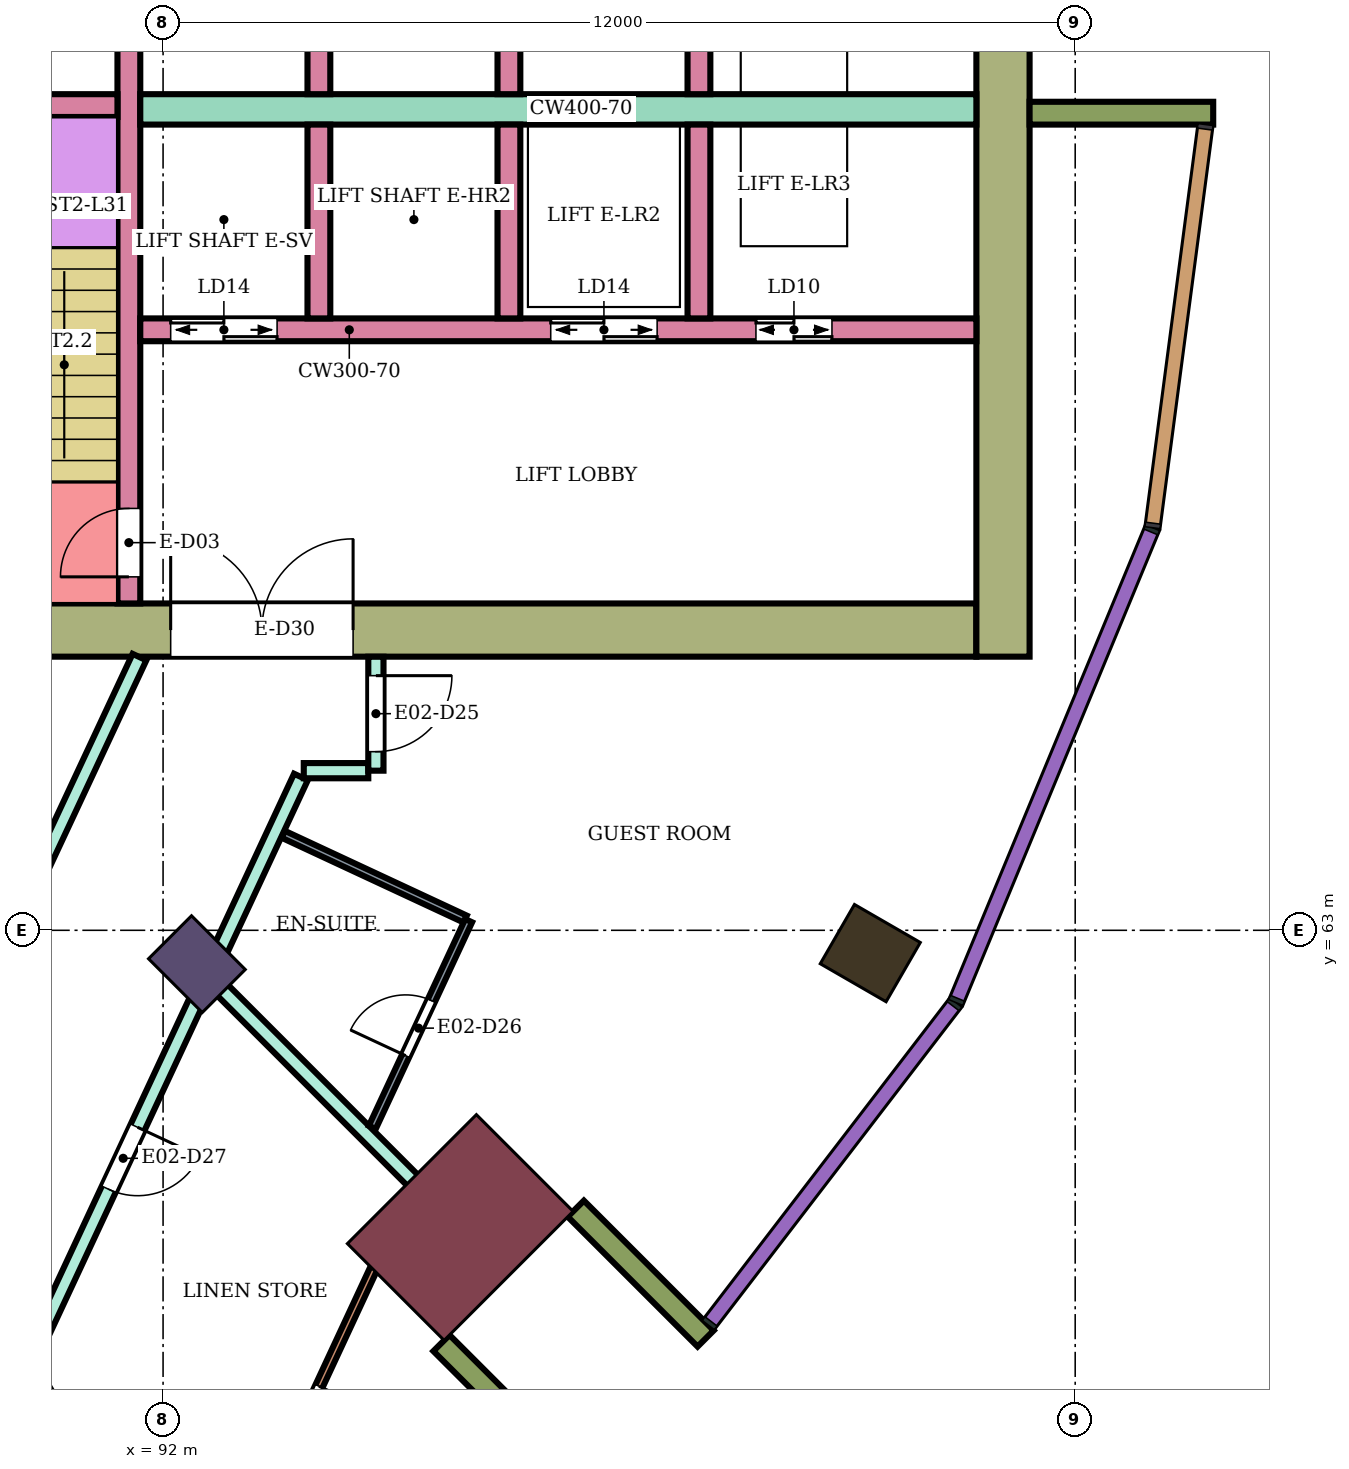
"""IFC4 building model, lengths in metres.
Left out: names, types, materials, properties, quantities, classifications, styles, units other than length and angle.
Written with IfcOpenShell. Run it as: python <this file> out.ifc"""

import sys

from ifc_helpers import new_model, si_unit, direction, frame, frame_2d, origin, origin_2d, place, context, subcontext, project, spatial, rectangle, extrude, element, fill, save


model = new_model("IFC4")
c1 = context("Model", 3, precision=1e-05, world=origin(), true_north=direction((0.0, 1.0)))
c2 = subcontext(c1, "Body", "Model", "MODEL_VIEW")
j1 = project(units=[si_unit("LENGTHUNIT", "METRE"), si_unit("PLANEANGLEUNIT", "RADIAN")], contexts=[c1])
p1 = place(None, origin())
s1 = spatial("IfcSite", under=j1, at=p1, CompositionType="ELEMENT")
p2 = place(p1, origin())
s2 = spatial("IfcBuilding", under=s1, at=p2, CompositionType="ELEMENT")
p3 = place(p2, frame((0.0, 0.0, 134.1)))
s3 = spatial("IfcBuildingStorey", under=s2, at=p3, CompositionType="ELEMENT", Elevation=134.1)
p4 = place(p3, frame((101.304, 62.7, 0.0), z_axis=(0.0, 0.0, 1.0), x_axis=(0.866025403784, -0.5, 0.0)))
e1 = element("IfcColumn", 1, at=p4, inside=s3, PredefinedType="COLUMN", context=c2, shape_type="SweptSolid", body=[
    extrude(rectangle(XDim=1.0, YDim=0.9, at=origin_2d()), origin(), (0.0, 0.0, 1.0), 3.9),
])
p5 = place(p3, frame((92.445, 62.555, 0.0), z_axis=(0.0, 0.0, 1.0), x_axis=(0.707106781187, -0.707106781187, 0.0)))
e2 = element("IfcColumn", 2, at=p5, inside=s3, PredefinedType="COLUMN", context=c2, shape_type="SweptSolid", body=[
    extrude(rectangle(XDim=1.0, YDim=0.8, at=origin_2d()), origin(), (0.0, 0.0, 1.0), 3.9),
])
p6 = place(p3, frame((95.91, 59.09, 0.0), z_axis=(0.0, 0.0, 1.0), x_axis=(0.707106781187, -0.707106781187, 0.0)))
e3 = element("IfcColumn", 3, at=p6, inside=s3, PredefinedType="COLUMN", context=c2, shape_type="SweptSolid", body=[
    extrude(rectangle(XDim=1.8, YDim=2.4, at=origin_2d()), origin(), (0.0, 0.0, 1.0), 3.9),
])
p7 = place(p3, frame((87.9, 66.95, 0.0), z_axis=(0.0, 0.0, 1.0), x_axis=(1.0, 0.0, 0.0)))
e4 = element("IfcWall", 4, at=p7, inside=s3, PredefinedType="SHEAR", context=c2, shape_type="SweptSolid", body=[
    extrude(rectangle(XDim=14.8, YDim=0.7, at=frame_2d((7.4, 0.0))), origin(), (0.0, 0.0, 1.0), 3.58),
])
p8 = place(p7, frame((4.2, 0.0, 0.0)))
e5 = element("IfcOpeningElement", 5, at=p8, cuts=e4, PredefinedType="OPENING", context=c2, shape_type="SweptSolid", body=[
    extrude(rectangle(XDim=2.4, YDim=2.4, at=frame_2d((1.2, 1.2))), frame((0.0, 0.36, 0.0), z_axis=(0.0, -1.0, 0.0), x_axis=(1.0, 0.0, 0.0)), (0.0, 0.0, 1.0), 0.72),
])
p9 = place(p3, frame((103.05, 66.6, 0.0), z_axis=(0.0, 0.0, 1.0), x_axis=(0.0, 1.0, 0.0)))
e6 = element("IfcWall", 6, at=p9, inside=s3, PredefinedType="SHEAR", context=c2, shape_type="SweptSolid", body=[
    extrude(rectangle(XDim=16.8, YDim=0.7, at=frame_2d((8.4, 0.0))), origin(), (0.0, 0.0, 1.0), 3.58),
])
p10 = place(p3, frame((91.55, 67.3, 0.0), z_axis=(0.0, 0.0, 1.0), x_axis=(0.0, 1.0, 0.0)))
e7 = element("IfcWall", 7, at=p10, inside=s3, PredefinedType="SHEAR", context=c2, shape_type="SweptSolid", body=[
    extrude(rectangle(XDim=7.7, YDim=0.3, at=frame_2d((3.85, 0.0))), origin(), (0.0, 0.0, 1.0), 3.58),
])
p11 = place(p10, frame((0.35, 0.0, 0.0)))
e8 = element("IfcOpeningElement", 8, at=p11, cuts=e7, PredefinedType="OPENING", context=c2, shape_type="SweptSolid", body=[
    extrude(rectangle(XDim=0.9, YDim=2.1, at=frame_2d((0.45, 1.05))), frame((0.0, 0.16, 0.0), z_axis=(0.0, -1.0, 0.0), x_axis=(1.0, 0.0, 0.0)), (0.0, 0.0, 1.0), 0.32),
])
p12 = place(p3, frame((88.35, 73.85, 0.0), z_axis=(0.0, 0.0, 1.0), x_axis=(1.0, 0.0, 0.0)))
e9 = element("IfcWall", 9, at=p12, inside=s3, PredefinedType="SHEAR", context=c2, shape_type="SweptSolid", body=[
    extrude(rectangle(XDim=3.05, YDim=0.3, at=frame_2d((1.525, 0.0))), origin(), (0.0, 0.0, 1.0), 3.58),
])
p13 = place(p3, frame((91.7, 73.8, 0.0), z_axis=(0.0, 0.0, 1.0), x_axis=(1.0, 0.0, 0.0)))
e10 = element("IfcWall", 10, at=p13, inside=s3, PredefinedType="SHEAR", context=c2, shape_type="SweptSolid", body=[
    extrude(rectangle(XDim=11.0, YDim=0.4, at=frame_2d((5.5, 0.0))), origin(), (0.0, 0.0, 1.0), 3.58),
])
p14 = place(p3, frame((91.7, 70.9, 0.0), z_axis=(0.0, 0.0, 1.0), x_axis=(1.0, 0.0, 0.0)))
e11 = element("IfcWall", 11, at=p14, inside=s3, PredefinedType="SHEAR", context=c2, shape_type="SweptSolid", body=[
    extrude(rectangle(XDim=11.0, YDim=0.3, at=frame_2d((5.5, 0.0))), origin(), (0.0, 0.0, 1.0), 3.58),
])
p15 = place(p14, frame((0.4, 0.0, 0.0)))
e12 = element("IfcOpeningElement", 12, at=p15, cuts=e11, PredefinedType="OPENING", context=c2, shape_type="SweptSolid", body=[
    extrude(rectangle(XDim=1.4, YDim=2.1, at=frame_2d((0.7, 1.05))), frame((0.0, 0.16, 0.0), z_axis=(0.0, -1.0, 0.0), x_axis=(1.0, 0.0, 0.0)), (0.0, 0.0, 1.0), 0.32),
])
p16 = place(p14, frame((5.4, 0.0, 0.0)))
e13 = element("IfcOpeningElement", 13, at=p16, cuts=e11, PredefinedType="OPENING", context=c2, shape_type="SweptSolid", body=[
    extrude(rectangle(XDim=1.4, YDim=2.1, at=frame_2d((0.7, 1.05))), frame((0.0, 0.16, 0.0), z_axis=(0.0, -1.0, 0.0), x_axis=(1.0, 0.0, 0.0)), (0.0, 0.0, 1.0), 0.32),
])
p17 = place(p14, frame((8.1, 0.0, 0.0)))
e14 = element("IfcOpeningElement", 14, at=p17, cuts=e11, PredefinedType="OPENING", context=c2, shape_type="SweptSolid", body=[
    extrude(rectangle(XDim=1.0, YDim=2.1, at=frame_2d((0.5, 1.05))), frame((0.0, 0.16, 0.0), z_axis=(0.0, -1.0, 0.0), x_axis=(1.0, 0.0, 0.0)), (0.0, 0.0, 1.0), 0.32),
])
for number, where, z_axis, x_axis in (
    (15, (94.05, 74.0, 0.0), (0.0, 0.0, 1.0), (0.0, 1.0, 0.0)),
    (16, (96.55, 74.0, 0.0), (0.0, 0.0, 1.0), (0.0, 1.0, 0.0)),
    (17, (99.05, 74.0, 0.0), (0.0, 0.0, 1.0), (0.0, 1.0, 0.0)),
    (18, (94.05, 71.05, 0.0), (0.0, 0.0, 1.0), (0.0, 1.0, 0.0)),
    (19, (96.55, 71.05, 0.0), (0.0, 0.0, 1.0), (0.0, 1.0, 0.0)),
    (20, (99.05, 71.05, 0.0), (0.0, 0.0, 1.0), (0.0, 1.0, 0.0)),
):
    element("IfcWall", number, at=place(p3, frame(where, z_axis=z_axis, x_axis=x_axis)), inside=s3, PredefinedType="SHEAR", context=c2, shape_type="SweptSolid", body=[
        extrude(rectangle(XDim=2.55, YDim=0.3, at=frame_2d((1.275, 0.0))), origin(), (0.0, 0.0, 1.0), 3.58),
    ])
for number, where, z_axis, x_axis in (
    (21, (103.4, 73.75, 0.0), (0.0, 0.0, 1.0), (1.0, 0.0, 0.0)),
    (22, (95.662, 57.57, 0.0), (0.0, 0.0, 1.0), (0.707, -0.707, 0.0)),
    (23, (97.43, 59.338, 0.0), (0.0, 0.0, 1.0), (0.707, -0.707, 0.0)),
):
    element("IfcWall", number, at=place(p3, frame(where, z_axis=z_axis, x_axis=x_axis)), inside=s3, PredefinedType="NOTDEFINED", context=c2, shape_type="SweptSolid", body=[
        extrude(rectangle(XDim=2.416, YDim=0.3, at=frame_2d((1.208, 0.0))), origin(), (0.0, 0.0, 1.0), 3.9),
    ])
p18 = place(p3, frame((88.502, 59.774, 0.0), z_axis=(0.0, 0.0, 1.0), x_axis=(0.423423307095, 0.905931952747, 0.0)))
e24 = element("IfcWall", 24, at=p18, inside=s3, PredefinedType="PARTITIONING", context=c2, shape_type="SweptSolid", body=[
    extrude(rectangle(XDim=7.529, YDim=0.2, at=frame_2d((3.764, 0.0))), origin(), (0.0, 0.0, 1.0), 3.45),
])
p19 = place(p3, frame((90.16, 57.396, 0.0), z_axis=(0.0, 0.0, 1.0), x_axis=(0.499848624781, -0.86611278267, 0.0)))
e25 = element("IfcWall", 25, at=p19, inside=s3, PredefinedType="PARTITIONING", context=c2, shape_type="SweptSolid", body=[
    extrude(rectangle(XDim=5.472, YDim=0.2, at=frame_2d((2.736, 0.0))), origin(), (0.0, 0.0, 1.0), 3.45),
])
p20 = place(p3, frame((90.346, 57.578, 0.0), z_axis=(0.0, 0.0, 1.0), x_axis=(0.422476720533, 0.906373775331, 0.0)))
e26 = element("IfcWall", 26, at=p20, inside=s3, PredefinedType="PARTITIONING", context=c2, shape_type="SweptSolid", body=[
    extrude(rectangle(XDim=8.208, YDim=0.2, at=frame_2d((4.104, 0.0))), origin(), (0.0, 0.0, 1.0), 3.45),
])
p21 = place(p20, frame((2.223, 0.0, 0.0)))
e27 = element("IfcOpeningElement", 27, at=p21, cuts=e26, PredefinedType="OPENING", context=c2, shape_type="SweptSolid", body=[
    extrude(rectangle(XDim=0.9, YDim=2.1, at=frame_2d((0.45, 1.05))), frame((0.0, 0.11, 0.0), z_axis=(0.0, -1.0, 0.0), x_axis=(1.0, 0.0, 0.0)), (0.0, 0.0, 1.0), 0.22),
])
p22 = place(p3, frame((92.692, 62.303, 0.0), z_axis=(0.0, 0.0, 1.0), x_axis=(0.706943936447, -0.707269588432, 0.0)))
e28 = element("IfcWall", 28, at=p22, inside=s3, PredefinedType="PARTITIONING", context=c2, shape_type="SweptSolid", body=[
    extrude(rectangle(XDim=5.248, YDim=0.2, at=frame_2d((2.624, 0.0))), origin(), (0.0, 0.0, 1.0), 3.45),
])
p23 = place(p3, frame((93.851, 65.1, 0.0), z_axis=(0.0, 0.0, 1.0), x_axis=(1.0, 0.0, 0.0)))
e29 = element("IfcWall", 29, at=p23, inside=s3, PredefinedType="PARTITIONING", context=c2, shape_type="SweptSolid", body=[
    extrude(rectangle(XDim=0.849, YDim=0.2, at=frame_2d((0.424, 0.0))), origin(), (0.0, 0.0, 1.0), 3.45),
])
p24 = place(p3, frame((94.8, 65.1, 0.0), z_axis=(0.0, 0.0, 1.0), x_axis=(0.0, 1.0, 0.0)))
e30 = element("IfcWall", 30, at=p24, inside=s3, PredefinedType="PARTITIONING", context=c2, shape_type="SweptSolid", body=[
    extrude(rectangle(XDim=1.499, YDim=0.2, at=frame_2d((0.75, 0.0))), origin(), (0.0, 0.0, 1.0), 3.45),
])
p25 = place(p24, frame((0.25, 0.0, 0.0)))
e31 = element("IfcOpeningElement", 31, at=p25, cuts=e30, PredefinedType="OPENING", context=c2, shape_type="SweptSolid", body=[
    extrude(rectangle(XDim=1.0, YDim=2.1, at=frame_2d((0.5, 1.05))), frame((0.0, 0.11, 0.0), z_axis=(0.0, -1.0, 0.0), x_axis=(1.0, 0.0, 0.0)), (0.0, 0.0, 1.0), 0.22),
])
p26 = place(p3, frame((92.477, 53.619, 0.0), z_axis=(0.0, 0.0, 1.0), x_axis=(0.421913254756, 0.90663620348, 0.0)))
e32 = element("IfcWall", 32, at=p26, inside=s3, PredefinedType="PARTITIONING", context=c2, shape_type="SweptSolid", body=[
    extrude(rectangle(XDim=6.573, YDim=0.1, at=frame_2d((3.287, 0.0))), origin(), (0.0, 0.0, 1.0), 2.68),
])
p27 = place(p26, frame((2.831, 0.0, 0.0)))
e33 = element("IfcOpeningElement", 33, at=p27, cuts=e32, PredefinedType="OPENING", context=c2, shape_type="SweptSolid", body=[
    extrude(rectangle(XDim=0.9, YDim=2.1, at=frame_2d((0.45, 1.05))), frame((0.0, 0.06, 0.0), z_axis=(0.0, -1.0, 0.0), x_axis=(1.0, 0.0, 0.0)), (0.0, 0.0, 1.0), 0.12),
])
p28 = place(p3, frame((93.582, 64.263, 0.0), z_axis=(0.0, 0.0, 1.0), x_axis=(0.906494794209, -0.422216991691, 0.0)))
e34 = element("IfcWall", 34, at=p28, inside=s3, PredefinedType="PARTITIONING", context=c2, shape_type="SweptSolid", body=[
    extrude(rectangle(XDim=2.64, YDim=0.1, at=frame_2d((1.32, 0.0))), origin(), (0.0, 0.0, 1.0), 3.45),
])
p29 = place(p3, frame((94.753, 60.408, 0.0), z_axis=(0.0, 0.0, 1.0), x_axis=(0.422435455794, 0.906393008406, 0.0)))
e35 = element("IfcWall", 35, at=p29, inside=s3, PredefinedType="PARTITIONING", context=c2, shape_type="SweptSolid", body=[
    extrude(rectangle(XDim=3.0, YDim=0.1, at=frame_2d((1.5, 0.0))), origin(), (0.0, 0.0, 1.0), 3.45),
])
p30 = place(p29, frame((1.04, 0.0, 0.0)))
e36 = element("IfcOpeningElement", 36, at=p30, cuts=e35, PredefinedType="OPENING", context=c2, shape_type="SweptSolid", body=[
    extrude(rectangle(XDim=0.8, YDim=2.1, at=frame_2d((0.4, 1.05))), frame((0.0, 0.06, 0.0), z_axis=(0.0, -1.0, 0.0), x_axis=(1.0, 0.0, 0.0)), (0.0, 0.0, 1.0), 0.12),
])
p31 = place(p25, frame((1.0, 0.0, 0.0), z_axis=(0.0, 0.0, 1.0), x_axis=(-1.0, 0.0, 0.0)))
e37 = element("IfcDoor", 37, at=p31, inside=s3, OperationType="SINGLE_SWING_LEFT", PredefinedType="DOOR", context=c2, shape_type="SweptSolid", body=[
    extrude(rectangle(XDim=1.0, YDim=2.1, at=frame_2d((0.5, 1.05))), frame((0.0, 0.025, 0.0), z_axis=(0.0, -1.0, 0.0), x_axis=(1.0, 0.0, 0.0)), (0.0, 0.0, 1.0), 0.05),
])
fill(e31, e37)
p32 = place(p30, origin())
e38 = element("IfcDoor", 38, at=p32, inside=s3, OperationType="SINGLE_SWING_LEFT", PredefinedType="DOOR", context=c2, shape_type="SweptSolid", body=[
    extrude(rectangle(XDim=0.8, YDim=2.1, at=frame_2d((0.4, 1.05))), frame((0.0, 0.025, 0.0), z_axis=(0.0, -1.0, 0.0), x_axis=(1.0, 0.0, 0.0)), (0.0, 0.0, 1.0), 0.05),
])
fill(e36, e38)
p33 = place(p21, frame((0.9, 0.0, 0.0), z_axis=(0.0, 0.0, 1.0), x_axis=(-1.0, 0.0, 0.0)))
e39 = element("IfcDoor", 39, at=p33, inside=s3, OperationType="SINGLE_SWING_LEFT", PredefinedType="DOOR", context=c2, shape_type="SweptSolid", body=[
    extrude(rectangle(XDim=0.9, YDim=2.1, at=frame_2d((0.45, 1.05))), frame((0.0, 0.025, 0.0), z_axis=(0.0, -1.0, 0.0), x_axis=(1.0, 0.0, 0.0)), (0.0, 0.0, 1.0), 0.05),
])
fill(e27, e39)
p34 = place(p27, frame((0.9, 0.0, 0.0), z_axis=(0.0, 0.0, 1.0), x_axis=(-1.0, 0.0, 0.0)))
e40 = element("IfcDoor", 40, at=p34, inside=s3, OperationType="SINGLE_SWING_LEFT", PredefinedType="DOOR", context=c2, shape_type="SweptSolid", body=[
    extrude(rectangle(XDim=0.9, YDim=2.1, at=frame_2d((0.45, 1.05))), frame((0.0, 0.025, 0.0), z_axis=(0.0, -1.0, 0.0), x_axis=(1.0, 0.0, 0.0)), (0.0, 0.0, 1.0), 0.05),
])
fill(e33, e40)
p35 = place(p11, origin())
e41 = element("IfcDoor", 41, at=p35, inside=s3, OperationType="SINGLE_SWING_LEFT", PredefinedType="DOOR", context=c2, shape_type="SweptSolid", body=[
    extrude(rectangle(XDim=0.9, YDim=2.1, at=frame_2d((0.45, 1.05))), frame((0.0, 0.025, 0.0), z_axis=(0.0, -1.0, 0.0), x_axis=(1.0, 0.0, 0.0)), (0.0, 0.0, 1.0), 0.05),
])
fill(e8, e41)
p36 = place(p15, origin())
e42 = element("IfcDoor", 42, at=p36, inside=s3, OperationType="DOUBLE_DOOR_SLIDING", PredefinedType="DOOR", context=c2, shape_type="SweptSolid", body=[
    extrude(rectangle(XDim=1.4, YDim=2.1, at=frame_2d((0.7, 1.05))), frame((0.0, 0.025, 0.0), z_axis=(0.0, -1.0, 0.0), x_axis=(1.0, 0.0, 0.0)), (0.0, 0.0, 1.0), 0.05),
])
fill(e12, e42)
p37 = place(p16, origin())
e43 = element("IfcDoor", 43, at=p37, inside=s3, OperationType="DOUBLE_DOOR_SLIDING", PredefinedType="DOOR", context=c2, shape_type="SweptSolid", body=[
    extrude(rectangle(XDim=1.4, YDim=2.1, at=frame_2d((0.7, 1.05))), frame((0.0, 0.025, 0.0), z_axis=(0.0, -1.0, 0.0), x_axis=(1.0, 0.0, 0.0)), (0.0, 0.0, 1.0), 0.05),
])
fill(e13, e43)
p38 = place(p17, origin())
e44 = element("IfcDoor", 44, at=p38, inside=s3, OperationType="DOUBLE_DOOR_SLIDING", PredefinedType="DOOR", context=c2, shape_type="SweptSolid", body=[
    extrude(rectangle(XDim=1.0, YDim=2.1, at=frame_2d((0.5, 1.05))), frame((0.0, 0.025, 0.0), z_axis=(0.0, -1.0, 0.0), x_axis=(1.0, 0.0, 0.0)), (0.0, 0.0, 1.0), 0.05),
])
fill(e14, e44)
p39 = place(p8, origin())
e45 = element("IfcDoor", 45, at=p39, inside=s3, OperationType="DOUBLE_DOOR_SINGLE_SWING", PredefinedType="DOOR", context=c2, shape_type="SweptSolid", body=[
    extrude(rectangle(XDim=2.4, YDim=2.4, at=frame_2d((1.2, 1.2))), frame((0.0, 0.025, 0.0), z_axis=(0.0, -1.0, 0.0), x_axis=(1.0, 0.0, 0.0)), (0.0, 0.0, 1.0), 0.05),
])
fill(e5, e45)
save(model, sys.argv[1])
